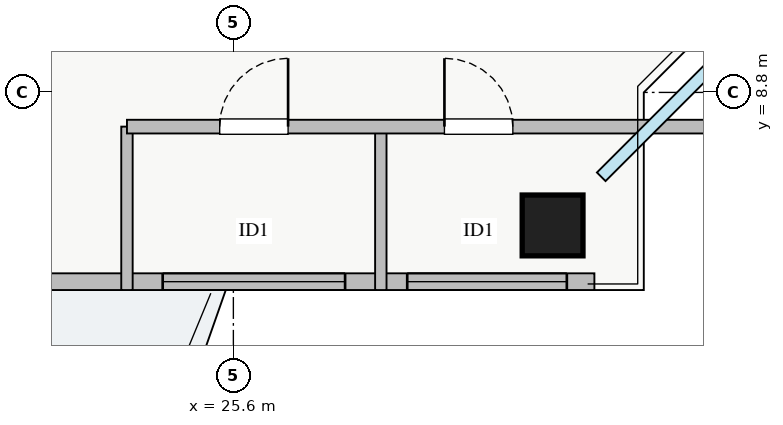
"""IFC4 building model, lengths in metres.
Left out: names, types, materials, properties, quantities, classifications, styles, units other than length and angle.
Written with IfcOpenShell. Run it as: python <this file> out.ifc"""

import sys

from ifc_helpers import new_model, si_unit, direction, frame, frame_2d, origin, origin_2d, place, context, subcontext, project, spatial, rectangle, extrude, source, transform, mapped, element, fill, save


model = new_model("IFC4")
c1 = context("Model", 3, precision=1e-05, world=origin(), true_north=direction((0.0, 1.0)))
c2 = subcontext(c1, "Body", "Model", "MODEL_VIEW")
j1 = project(units=[si_unit("LENGTHUNIT", "METRE"), si_unit("PLANEANGLEUNIT", "RADIAN")], contexts=[c1])
p1 = place(None, origin())
s1 = spatial("IfcSite", under=j1, at=p1, CompositionType="ELEMENT")
p2 = place(p1, origin())
s2 = spatial("IfcBuilding", under=s1, at=p2, CompositionType="ELEMENT")
p3 = place(p2, frame((0.0, 0.0, 229.5)))
s3 = spatial("IfcBuildingStorey", under=s2, at=p3, CompositionType="ELEMENT", Elevation=229.5)
m1 = source(origin(), c2, "Body", "SweptSolid", [
    extrude(rectangle(XDim=0.8, YDim=0.8, at=origin_2d()), origin(), (0.0, 0.0, 1.0), 3.25),
])
p4 = place(p3, frame((29.8, 7.05, 0.0), z_axis=(0.0, 0.0, 1.0), x_axis=(1.0, 0.0, 0.0)))
e1 = element("IfcColumn", 1, at=p4, inside=s3, PredefinedType="COLUMN", context=c2, shape_type="MappedRepresentation", body=[
    mapped(m1, transform((0.0, 0.0, 0.0), x_axis=(1.0, 0.0, 0.0), y_axis=(0.0, 1.0, 0.0), z_axis=(0.0, 0.0, 1.0), scale=1.0)),
])
p5 = place(p3, frame((7.65, 6.31, 0.0), z_axis=(0.0, 0.0, 1.0), x_axis=(1.0, 0.0, 0.0)))
e2 = element("IfcWall", 2, at=p5, inside=s3, PredefinedType="STANDARD", context=c2, shape_type="SweptSolid", body=[
    extrude(rectangle(XDim=22.7, YDim=0.22, at=frame_2d((11.35, 0.0))), origin(), (0.0, 0.0, 1.0), 2.57),
])
p6 = place(p5, frame((12.2, 0.0, 0.0)))
e3 = element("IfcOpeningElement", 3, at=p6, cuts=e2, PredefinedType="OPENING", context=c2, shape_type="SweptSolid", body=[
    extrude(rectangle(XDim=1.2, YDim=2.1, at=frame_2d((0.6, 1.05))), frame((0.0, 0.12, 0.0), z_axis=(0.0, -1.0, 0.0), x_axis=(1.0, 0.0, 0.0)), (0.0, 0.0, 1.0), 0.24),
])
p7 = place(p5, frame((1.637, 0.0, 0.9)))
e4 = element("IfcOpeningElement", 4, at=p7, cuts=e2, PredefinedType="OPENING", context=c2, shape_type="SweptSolid", body=[
    extrude(rectangle(XDim=2.4, YDim=1.48, at=frame_2d((1.2, 0.74))), frame((0.0, 0.12, 0.0), z_axis=(0.0, -1.0, 0.0), x_axis=(1.0, 0.0, 0.0)), (0.0, 0.0, 1.0), 0.24),
])
p8 = place(p5, frame((7.612, 0.0, 0.9)))
e5 = element("IfcOpeningElement", 5, at=p8, cuts=e2, PredefinedType="OPENING", context=c2, shape_type="SweptSolid", body=[
    extrude(rectangle(XDim=1.8, YDim=1.45, at=frame_2d((0.9, 0.725))), frame((0.0, 0.12, 0.0), z_axis=(0.0, -1.0, 0.0), x_axis=(1.0, 0.0, 0.0)), (0.0, 0.0, 1.0), 0.24),
])
p9 = place(p5, frame((20.238, 0.0, 0.9)))
e6 = element("IfcOpeningElement", 6, at=p9, cuts=e2, PredefinedType="OPENING", context=c2, shape_type="SweptSolid", body=[
    extrude(rectangle(XDim=2.1, YDim=1.5, at=frame_2d((1.05, 0.75))), frame((0.0, 0.12, 0.0), z_axis=(0.0, -1.0, 0.0), x_axis=(1.0, 0.0, 0.0)), (0.0, 0.0, 1.0), 0.24),
])
p10 = place(p5, frame((17.02, 0.0, 0.9)))
e7 = element("IfcOpeningElement", 7, at=p10, cuts=e2, PredefinedType="OPENING", context=c2, shape_type="SweptSolid", body=[
    extrude(rectangle(XDim=2.4, YDim=1.5, at=frame_2d((1.2, 0.75))), frame((0.0, 0.12, 0.0), z_axis=(0.0, -1.0, 0.0), x_axis=(1.0, 0.0, 0.0)), (0.0, 0.0, 1.0), 0.24),
])
for number, where, z_axis, x_axis in (
    (8, (24.2, 6.2, 0.0), (0.0, 0.0, 1.0), (0.0, 1.0, 0.0)),
    (9, (27.54, 6.2, 0.0), (0.0, 0.0, 1.0), (0.0, 1.0, 0.0)),
):
    element("IfcWall", number, at=place(p3, frame(where, z_axis=z_axis, x_axis=x_axis)), inside=s3, PredefinedType="PARTITIONING", context=c2, shape_type="SweptSolid", body=[
        extrude(rectangle(XDim=2.15, YDim=0.15, at=frame_2d((1.075, 0.0))), origin(), (0.0, 0.0, 1.0), 3.03),
    ])
p11 = place(p3, frame((24.2, 8.35, 0.0), z_axis=(0.0, 0.0, 1.0), x_axis=(1.0, 0.0, 0.0)))
e10 = element("IfcWall", 10, at=p11, inside=s3, PredefinedType="PARTITIONING", context=c2, shape_type="SweptSolid", body=[
    extrude(rectangle(XDim=8.25, YDim=0.18, at=frame_2d((4.125, 0.0))), origin(), (0.0, 0.0, 1.0), 3.03),
])
p12 = place(p11, frame((1.22, 0.0, 0.0)))
e11 = element("IfcOpeningElement", 11, at=p12, cuts=e10, PredefinedType="OPENING", context=c2, shape_type="SweptSolid", body=[
    extrude(rectangle(XDim=0.9, YDim=2.05, at=frame_2d((0.45, 1.025))), frame((0.0, 0.1, 0.0), z_axis=(0.0, -1.0, 0.0), x_axis=(1.0, 0.0, 0.0)), (0.0, 0.0, 1.0), 0.2),
])
p13 = place(p11, frame((4.177, 0.0, 0.0)))
e12 = element("IfcOpeningElement", 12, at=p13, cuts=e10, PredefinedType="OPENING", context=c2, shape_type="SweptSolid", body=[
    extrude(rectangle(XDim=0.9, YDim=2.05, at=frame_2d((0.45, 1.025))), frame((0.0, 0.1, 0.0), z_axis=(0.0, -1.0, 0.0), x_axis=(1.0, 0.0, 0.0)), (0.0, 0.0, 1.0), 0.2),
])
m2 = source(origin(), c2, "Body", "SweptSolid", [
    extrude(rectangle(XDim=2.1, YDim=1.5, at=frame_2d((1.05, 0.75))), frame((0.0, 0.03, 0.0), z_axis=(0.0, -1.0, 0.0), x_axis=(1.0, 0.0, 0.0)), (0.0, 0.0, 1.0), 0.06),
])
p14 = place(p9, origin())
e13 = element("IfcWindow", 13, at=p14, inside=s3, PartitioningType="TRIPLE_PANEL_VERTICAL", PredefinedType="WINDOW", context=c2, shape_type="MappedRepresentation", body=[
    mapped(m2, transform((0.0, 0.0, 0.0), x_axis=(1.0, 0.0, 0.0), y_axis=(0.0, 1.0, 0.0), z_axis=(0.0, 0.0, 1.0), scale=1.0)),
])
fill(e6, e13)
m3 = source(origin(), c2, "Body", "SweptSolid", [
    extrude(rectangle(XDim=0.9, YDim=2.05, at=frame_2d((0.45, 1.025))), frame((0.0, 0.025, 0.0), z_axis=(0.0, -1.0, 0.0), x_axis=(1.0, 0.0, 0.0)), (0.0, 0.0, 1.0), 0.05),
])
p15 = place(p12, origin())
e14 = element("IfcDoor", 14, at=p15, inside=s3, OperationType="SINGLE_SWING_RIGHT", PredefinedType="DOOR", context=c2, shape_type="MappedRepresentation", body=[
    mapped(m3, transform((0.0, 0.0, 0.0), x_axis=(1.0, 0.0, 0.0), y_axis=(0.0, 1.0, 0.0), z_axis=(0.0, 0.0, 1.0), scale=1.0)),
])
fill(e11, e14)
p16 = place(p13, origin())
e15 = element("IfcDoor", 15, at=p16, inside=s3, OperationType="SINGLE_SWING_LEFT", PredefinedType="DOOR", context=c2, shape_type="MappedRepresentation", body=[
    mapped(m3, transform((0.0, 0.0, 0.0), x_axis=(1.0, 0.0, 0.0), y_axis=(0.0, 1.0, 0.0), z_axis=(0.0, 0.0, 1.0), scale=1.0)),
])
fill(e12, e15)
m4 = source(origin(), c2, "Body", "SweptSolid", [
    extrude(rectangle(XDim=2.4, YDim=1.5, at=frame_2d((1.2, 0.75))), frame((0.0, 0.03, 0.0), z_axis=(0.0, -1.0, 0.0), x_axis=(1.0, 0.0, 0.0)), (0.0, 0.0, 1.0), 0.06),
])
p17 = place(p10, origin())
e16 = element("IfcWindow", 16, at=p17, inside=s3, PartitioningType="TRIPLE_PANEL_VERTICAL", PredefinedType="WINDOW", context=c2, shape_type="MappedRepresentation", body=[
    mapped(m4, transform((0.0, 0.0, 0.0), x_axis=(1.0, 0.0, 0.0), y_axis=(0.0, 1.0, 0.0), z_axis=(0.0, 0.0, 1.0), scale=1.0)),
])
fill(e7, e16)
save(model, sys.argv[1])
